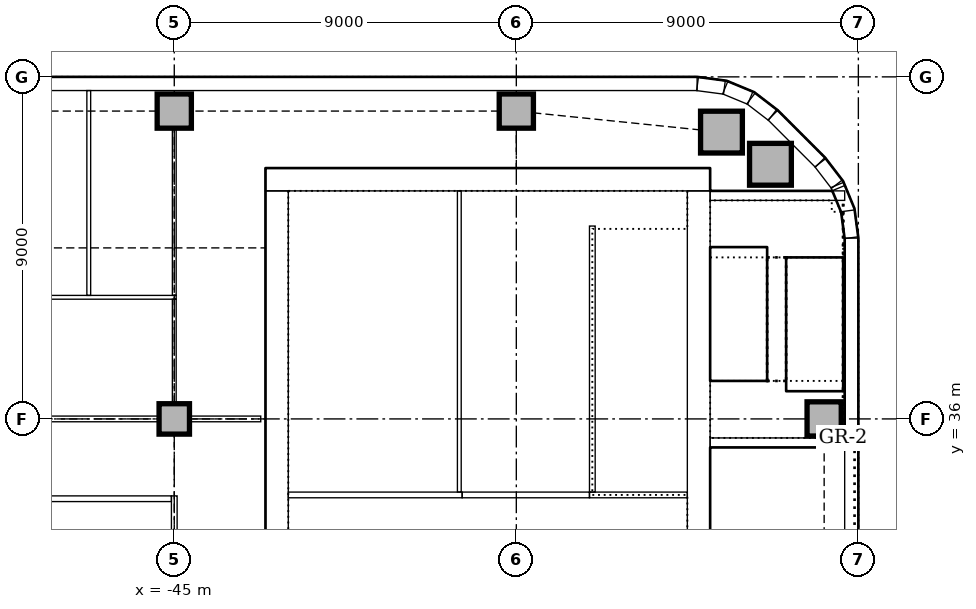
"""IFC4 building model, lengths in metres.
Left out: names, types, materials, properties, quantities, classifications, styles, units other than length and angle.
Written with IfcOpenShell. Run it as: python <this file> out.ifc"""

import sys

from ifc_helpers import new_model, si_unit, direction, frame, frame_2d, origin, origin_2d, place, context, subcontext, project, spatial, rectangle, extrude, element, fill, save


model = new_model("IFC4")
c1 = context("Model", 3, precision=1e-05, world=origin(), true_north=direction((0.0, 1.0)))
c2 = subcontext(c1, "Body", "Model", "MODEL_VIEW")
j1 = project(units=[si_unit("LENGTHUNIT", "METRE"), si_unit("PLANEANGLEUNIT", "RADIAN")], contexts=[c1])
p1 = place(None, origin())
s1 = spatial("IfcSite", under=j1, at=p1, CompositionType="ELEMENT")
p2 = place(p1, origin())
s2 = spatial("IfcBuilding", under=s1, at=p2, CompositionType="ELEMENT")
p3 = place(p2, frame((0.0, 0.0, 26.0)))
s3 = spatial("IfcBuildingStorey", under=s2, at=p3, CompositionType="ELEMENT", Elevation=26.0)
p4 = place(p3, frame((-30.9, 42.3, 0.0), z_axis=(0.0, 0.0, 1.0), x_axis=(-1.0, 0.0, 0.0)))
e1 = element("IfcWall", 1, at=p4, inside=s3, PredefinedType="SOLIDWALL", context=c2, shape_type="SweptSolid", body=[
    extrude(rectangle(XDim=11.7, YDim=0.6, at=frame_2d((5.85, 0.0))), origin(), (0.0, 0.0, 1.0), 4.0),
])
p5 = place(p3, frame((-31.2, 30.5, 0.0), z_axis=(0.0, 0.0, 1.0), x_axis=(0.0, 1.0, 0.0)))
e2 = element("IfcWall", 2, at=p5, inside=s3, PredefinedType="SOLIDWALL", context=c2, shape_type="SweptSolid", body=[
    extrude(rectangle(XDim=11.5, YDim=0.6, at=frame_2d((5.75, 0.0))), origin(), (0.0, 0.0, 1.0), 4.0),
])
p6 = place(p5, frame((0.85, 0.0, 0.0)))
e3 = element("IfcOpeningElement", 3, at=p6, cuts=e2, PredefinedType="OPENING", context=c2, shape_type="SweptSolid", body=[
    extrude(rectangle(XDim=1.8, YDim=2.1, at=frame_2d((0.9, 1.05))), frame((0.0, 0.31, 0.0), z_axis=(0.0, -1.0, 0.0), x_axis=(1.0, 0.0, 0.0)), (0.0, 0.0, 1.0), 0.62),
])
p7 = place(p3, frame((-42.3, 42.0, 0.0), z_axis=(0.0, 0.0, 1.0), x_axis=(0.0, -1.0, 0.0)))
e4 = element("IfcWall", 4, at=p7, inside=s3, PredefinedType="SOLIDWALL", context=c2, shape_type="SweptSolid", body=[
    extrude(rectangle(XDim=11.5, YDim=0.6, at=frame_2d((5.75, 0.0))), origin(), (0.0, 0.0, 1.0), 4.0),
])
p8 = place(p7, frame((8.85, 0.0, 0.0)))
e5 = element("IfcOpeningElement", 5, at=p8, cuts=e4, PredefinedType="OPENING", context=c2, shape_type="SweptSolid", body=[
    extrude(rectangle(XDim=1.8, YDim=2.1, at=frame_2d((0.9, 1.05))), frame((0.0, 0.31, 0.0), z_axis=(0.0, -1.0, 0.0), x_axis=(1.0, 0.0, 0.0)), (0.0, 0.0, 1.0), 0.62),
])
p9 = place(p3, frame((-30.9, 35.375, 0.0), z_axis=(0.0, 0.0, 1.0), x_axis=(1.0, 0.0, 0.0)))
e6 = element("IfcWall", 6, at=p9, inside=s3, PredefinedType="SOLIDWALL", context=c2, shape_type="SweptSolid", body=[
    extrude(rectangle(XDim=3.54, YDim=0.25, at=frame_2d((1.77, 0.0))), origin(), (0.0, 0.0, 1.0), 4.0),
])
p10 = place(p9, frame((0.75, 0.0, 0.0)))
e7 = element("IfcOpeningElement", 7, at=p10, cuts=e6, PredefinedType="OPENING", context=c2, shape_type="SweptSolid", body=[
    extrude(rectangle(XDim=1.1, YDim=2.1, at=frame_2d((0.55, 1.05))), frame((0.0, 0.135, 0.0), z_axis=(0.0, -1.0, 0.0), x_axis=(1.0, 0.0, 0.0)), (0.0, 0.0, 1.0), 0.27),
])
p11 = place(p3, frame((-27.36, 41.875, 0.0), z_axis=(0.0, 0.0, 1.0), x_axis=(-1.0, 0.0, 0.0)))
e8 = element("IfcWall", 8, at=p11, inside=s3, PredefinedType="SOLIDWALL", context=c2, shape_type="SweptSolid", body=[
    extrude(rectangle(XDim=3.54, YDim=0.25, at=frame_2d((1.77, 0.0))), origin(), (0.0, 0.0, 1.0), 4.0),
])
for number, where, z_axis, x_axis in (
    (9, (-29.313, 42.7, 0.0), (0.0, 0.0, 1.0), (1.0, 0.0, 0.0)),
    (10, (-30.602, 43.547, 0.0), (0.0, 0.0, 1.0), (1.0, 0.0, 0.0)),
):
    element("IfcColumn", number, at=place(p3, frame(where, z_axis=z_axis, x_axis=x_axis)), inside=s3, PredefinedType="COLUMN", context=c2, shape_type="SweptSolid", body=[
        extrude(rectangle(XDim=1.1, YDim=1.1, at=origin_2d()), origin(), (0.0, 0.0, 1.0), 3.85),
    ])
p12 = place(p3, frame((-27.9, 36.0, 0.0), z_axis=(0.0, 0.0, 1.0), x_axis=(1.0, 0.0, 0.0)))
e11 = element("IfcColumn", 11, at=p12, inside=s3, PredefinedType="COLUMN", context=c2, shape_type="SweptSolid", body=[
    extrude(rectangle(XDim=0.9, YDim=0.9, at=origin_2d()), origin(), (0.0, 0.0, 1.0), 4.0),
])
for number, where, z_axis, x_axis in (
    (12, (-45.0, 44.1, 0.0), (0.0, 0.0, 1.0), (1.0, 0.0, 0.0)),
    (13, (-36.0, 44.1, 0.0), (0.0, 0.0, 1.0), (1.0, 0.0, 0.0)),
):
    element("IfcColumn", number, at=place(p3, frame(where, z_axis=z_axis, x_axis=x_axis)), inside=s3, PredefinedType="COLUMN", context=c2, shape_type="SweptSolid", body=[
        extrude(rectangle(XDim=0.9, YDim=0.9, at=origin_2d()), origin(), (0.0, 0.0, 1.0), 3.85),
    ])
p13 = place(p3, frame((-45.0, 36.0, 0.0), z_axis=(0.0, 0.0, 1.0), x_axis=(1.0, 0.0, 0.0)))
e14 = element("IfcColumn", 14, at=p13, inside=s3, PredefinedType="COLUMN", context=c2, shape_type="SweptSolid", body=[
    extrude(rectangle(XDim=0.8, YDim=0.8, at=origin_2d()), origin(), (0.0, 0.0, 1.0), 3.85),
])
p14 = place(p3, frame((-27.18, 27.75, 0.0), z_axis=(0.0, 0.0, 1.0), x_axis=(0.0, 1.0, 0.0)))
e15 = element("IfcWall", 15, at=p14, inside=s3, PredefinedType="STANDARD", context=c2, shape_type="SweptSolid", body=[
    extrude(rectangle(XDim=7.5, YDim=0.36, at=frame_2d((3.75, 0.0))), origin(), (0.0, 0.0, 1.0), 3.85),
])
p15 = place(p14, frame((2.85, 0.0, 1.2)))
e16 = element("IfcOpeningElement", 16, at=p15, cuts=e15, PredefinedType="OPENING", context=c2, shape_type="SweptSolid", body=[
    extrude(rectangle(XDim=1.8, YDim=1.2, at=frame_2d((0.9, 0.6))), frame((0.0, 0.19, 0.0), z_axis=(0.0, -1.0, 0.0), x_axis=(1.0, 0.0, 0.0)), (0.0, 0.0, 1.0), 0.38),
])
p16 = place(p3, frame((-27.18, 35.25, 0.0), z_axis=(0.0, 0.0, 1.0), x_axis=(0.0, 1.0, 0.0)))
e17 = element("IfcWall", 17, at=p16, inside=s3, PredefinedType="STANDARD", context=c2, shape_type="SweptSolid", body=[
    extrude(rectangle(XDim=5.507, YDim=0.36, at=frame_2d((2.754, 0.0))), origin(), (0.0, 0.0, 1.0), 3.85),
])
p17 = place(p3, frame((-28.006, 42.751, 0.0), z_axis=(0.0, 0.0, 1.0), x_axis=(-0.707106781187, 0.707106781187, 0.0)))
e18 = element("IfcWall", 18, at=p17, inside=s3, PredefinedType="STANDARD", context=c2, shape_type="SweptSolid", body=[
    extrude(rectangle(XDim=1.757, YDim=0.36, at=frame_2d((0.879, 0.0))), origin(), (0.0, 0.0, 1.0), 3.85),
])
p18 = place(p3, frame((-31.243, 44.82, 0.0), z_axis=(0.0, 0.0, 1.0), x_axis=(-1.0, 0.0, 0.0)))
e19 = element("IfcWall", 19, at=p18, inside=s3, PredefinedType="STANDARD", context=c2, shape_type="SweptSolid", body=[
    extrude(rectangle(XDim=36.515, YDim=0.36, at=frame_2d((18.257, 0.0))), origin(), (0.0, 0.0, 1.0), 3.85),
])
p19 = place(p18, frame((3.107, 0.0, 0.9)))
e20 = element("IfcOpeningElement", 20, at=p19, cuts=e19, PredefinedType="OPENING", context=c2, shape_type="SweptSolid", body=[
    extrude(rectangle(XDim=3.3, YDim=1.6, at=frame_2d((1.65, 0.8))), frame((0.0, 0.19, 0.0), z_axis=(0.0, -1.0, 0.0), x_axis=(1.0, 0.0, 0.0)), (0.0, 0.0, 1.0), 0.38),
])
p20 = place(p18, frame((7.607, 0.0, 0.9)))
e21 = element("IfcOpeningElement", 21, at=p20, cuts=e19, PredefinedType="OPENING", context=c2, shape_type="SweptSolid", body=[
    extrude(rectangle(XDim=3.3, YDim=1.6, at=frame_2d((1.65, 0.8))), frame((0.0, 0.19, 0.0), z_axis=(0.0, -1.0, 0.0), x_axis=(1.0, 0.0, 0.0)), (0.0, 0.0, 1.0), 0.38),
])
p21 = place(p18, frame((12.107, 0.0, 0.9)))
e22 = element("IfcOpeningElement", 22, at=p21, cuts=e19, PredefinedType="OPENING", context=c2, shape_type="SweptSolid", body=[
    extrude(rectangle(XDim=3.3, YDim=1.6, at=frame_2d((1.65, 0.8))), frame((0.0, 0.19, 0.0), z_axis=(0.0, -1.0, 0.0), x_axis=(1.0, 0.0, 0.0)), (0.0, 0.0, 1.0), 0.38),
])
p22 = place(p18, frame((16.607, 0.0, 0.9)))
e23 = element("IfcOpeningElement", 23, at=p22, cuts=e19, PredefinedType="OPENING", context=c2, shape_type="SweptSolid", body=[
    extrude(rectangle(XDim=3.3, YDim=1.6, at=frame_2d((1.65, 0.8))), frame((0.0, 0.19, 0.0), z_axis=(0.0, -1.0, 0.0), x_axis=(1.0, 0.0, 0.0)), (0.0, 0.0, 1.0), 0.38),
])
p23 = place(p18, frame((21.107, 0.0, 0.9)))
e24 = element("IfcOpeningElement", 24, at=p23, cuts=e19, PredefinedType="OPENING", context=c2, shape_type="SweptSolid", body=[
    extrude(rectangle(XDim=3.3, YDim=1.6, at=frame_2d((1.65, 0.8))), frame((0.0, 0.19, 0.0), z_axis=(0.0, -1.0, 0.0), x_axis=(1.0, 0.0, 0.0)), (0.0, 0.0, 1.0), 0.38),
])
p24 = place(p18, frame((25.607, 0.0, 0.9)))
e25 = element("IfcOpeningElement", 25, at=p24, cuts=e19, PredefinedType="OPENING", context=c2, shape_type="SweptSolid", body=[
    extrude(rectangle(XDim=3.3, YDim=1.6, at=frame_2d((1.65, 0.8))), frame((0.0, 0.19, 0.0), z_axis=(0.0, -1.0, 0.0), x_axis=(1.0, 0.0, 0.0)), (0.0, 0.0, 1.0), 0.38),
])
p25 = place(p18, frame((30.107, 0.0, 0.9)))
e26 = element("IfcOpeningElement", 26, at=p25, cuts=e19, PredefinedType="OPENING", context=c2, shape_type="SweptSolid", body=[
    extrude(rectangle(XDim=3.3, YDim=1.6, at=frame_2d((1.65, 0.8))), frame((0.0, 0.19, 0.0), z_axis=(0.0, -1.0, 0.0), x_axis=(1.0, 0.0, 0.0)), (0.0, 0.0, 1.0), 0.38),
])
p26 = place(p3, frame((-27.183, 40.769, 0.0), z_axis=(0.0, 0.0, 1.0), x_axis=(-0.13055608231, 0.99144092581, 0.0)))
e27 = element("IfcWall", 27, at=p26, inside=s3, PredefinedType="STANDARD", context=c2, shape_type="SweptSolid", body=[
    extrude(rectangle(XDim=0.713, YDim=0.36, at=frame_2d((0.356, 0.0))), origin(), (0.0, 0.0, 1.0), 3.85),
])
p27 = place(p3, frame((-27.521, 42.074, 0.0), z_axis=(0.0, 0.0, 1.0), x_axis=(-0.382549378284, 0.923935048136, 0.0)))
e28 = element("IfcWall", 28, at=p27, inside=s3, PredefinedType="STANDARD", context=c2, shape_type="SweptSolid", body=[
    extrude(rectangle(XDim=0.089, YDim=0.36, at=frame_2d((0.045, 0.0))), origin(), (0.0, 0.0, 1.0), 3.85),
])
for number, where, z_axis, x_axis in (
    (29, (-27.566, 42.175, 0.0), (0.0, 0.0, 1.0), (-0.609, 0.793, 0.0)),
    (30, (-29.259, 44.0, 0.0), (0.0, 0.0, 1.0), (-0.793, 0.609, 0.0)),
):
    element("IfcWall", number, at=place(p3, frame(where, z_axis=z_axis, x_axis=x_axis)), inside=s3, PredefinedType="STANDARD", context=c2, shape_type="SweptSolid", body=[
        extrude(rectangle(XDim=0.713, YDim=0.36, at=frame_2d((0.357, 0.0))), origin(), (0.0, 0.0, 1.0), 3.85),
    ])
for number, where, z_axis, x_axis in (
    (31, (-29.844, 44.445, 0.0), (0.0, 0.0, 1.0), (-0.924, 0.383, 0.0)),
    (32, (-30.524, 44.724, 0.0), (0.0, 0.0, 1.0), (-0.991, 0.131, 0.0)),
):
    element("IfcWall", number, at=place(p3, frame(where, z_axis=z_axis, x_axis=x_axis)), inside=s3, PredefinedType="STANDARD", context=c2, shape_type="SweptSolid", body=[
        extrude(rectangle(XDim=0.713, YDim=0.36, at=frame_2d((0.356, 0.0))), origin(), (0.0, 0.0, 1.0), 3.85),
    ])
p28 = place(p3, frame((-34.075, 34.0, 0.0), z_axis=(0.0, 0.0, 1.0), x_axis=(1.0, 0.0, 0.0)))
e33 = element("IfcWall", 33, at=p28, inside=s3, PredefinedType="SOLIDWALL", context=c2, shape_type="SweptSolid", body=[
    extrude(rectangle(XDim=2.575, YDim=0.15, at=frame_2d((1.288, 0.0))), origin(), (0.0, 0.0, 1.0), 4.0),
])
p29 = place(p3, frame((-34.0, 41.075, 0.0), z_axis=(0.0, 0.0, 1.0), x_axis=(0.0, -1.0, 0.0)))
e34 = element("IfcWall", 34, at=p29, inside=s3, PredefinedType="SOLIDWALL", context=c2, shape_type="SweptSolid", body=[
    extrude(rectangle(XDim=7.0, YDim=0.15, at=frame_2d((3.5, 0.0))), origin(), (0.0, 0.0, 1.0), 4.0),
])
p30 = place(p3, frame((-37.425, 34.0, 0.0), z_axis=(0.0, 0.0, 1.0), x_axis=(-1.0, 0.0, 0.0)))
e35 = element("IfcWall", 35, at=p30, inside=s3, PredefinedType="PARTITIONING", context=c2, shape_type="SweptSolid", body=[
    extrude(rectangle(XDim=4.575, YDim=0.15, at=frame_2d((2.288, 0.0))), origin(), (0.0, 0.0, 1.0), 3.85),
])
p31 = place(p30, frame((1.925, 0.0, 0.0)))
e36 = element("IfcOpeningElement", 36, at=p31, cuts=e35, PredefinedType="OPENING", context=c2, shape_type="SweptSolid", body=[
    extrude(rectangle(XDim=0.8, YDim=2.1, at=frame_2d((0.4, 1.05))), frame((0.0, 0.085, 0.0), z_axis=(0.0, -1.0, 0.0), x_axis=(1.0, 0.0, 0.0)), (0.0, 0.0, 1.0), 0.17),
])
p32 = place(p3, frame((-34.075, 34.0, 0.0), z_axis=(0.0, 0.0, 1.0), x_axis=(-1.0, 0.0, 0.0)))
e37 = element("IfcWall", 37, at=p32, inside=s3, PredefinedType="PARTITIONING", context=c2, shape_type="SweptSolid", body=[
    extrude(rectangle(XDim=3.35, YDim=0.15, at=frame_2d((1.675, 0.0))), origin(), (0.0, 0.0, 1.0), 3.85),
])
p33 = place(p32, frame((1.275, 0.0, 0.0)))
e38 = element("IfcOpeningElement", 38, at=p33, cuts=e37, PredefinedType="OPENING", context=c2, shape_type="SweptSolid", body=[
    extrude(rectangle(XDim=0.8, YDim=2.1, at=frame_2d((0.4, 1.05))), frame((0.0, 0.085, 0.0), z_axis=(0.0, -1.0, 0.0), x_axis=(1.0, 0.0, 0.0)), (0.0, 0.0, 1.0), 0.17),
])
p34 = place(p3, frame((-37.5, 34.075, 0.0), z_axis=(0.0, 0.0, 1.0), x_axis=(0.0, 1.0, 0.0)))
e39 = element("IfcWall", 39, at=p34, inside=s3, PredefinedType="PARTITIONING", context=c2, shape_type="SweptSolid", body=[
    extrude(rectangle(XDim=7.925, YDim=0.1, at=frame_2d((3.962, 0.0))), origin(), (0.0, 0.0, 1.0), 3.85),
])
p35 = place(p3, frame((-44.6, 36.0, 0.0), z_axis=(0.0, 0.0, 1.0), x_axis=(1.0, 0.0, 0.0)))
e40 = element("IfcWall", 40, at=p35, inside=s3, PredefinedType="PARTITIONING", context=c2, shape_type="SweptSolid", body=[
    extrude(rectangle(XDim=1.875, YDim=0.15, at=frame_2d((0.938, 0.0))), origin(), (0.0, 0.0, 1.0), 3.602),
])
p36 = place(p35, frame((0.5, 0.0, 0.0)))
e41 = element("IfcOpeningElement", 41, at=p36, cuts=e40, PredefinedType="OPENING", context=c2, shape_type="SweptSolid", body=[
    extrude(rectangle(XDim=0.9, YDim=2.1, at=frame_2d((0.45, 1.05))), frame((0.0, 0.085, 0.0), z_axis=(0.0, -1.0, 0.0), x_axis=(1.0, 0.0, 0.0)), (0.0, 0.0, 1.0), 0.17),
])
p37 = place(p3, frame((-53.6, 36.0, 0.0), z_axis=(0.0, 0.0, 1.0), x_axis=(1.0, 0.0, 0.0)))
e42 = element("IfcWall", 42, at=p37, inside=s3, PredefinedType="PARTITIONING", context=c2, shape_type="SweptSolid", body=[
    extrude(rectangle(XDim=8.2, YDim=0.15, at=frame_2d((4.1, 0.0))), origin(), (0.0, 0.0, 1.0), 3.15),
])
p38 = place(p37, frame((2.89, 0.0, 0.0)))
e43 = element("IfcOpeningElement", 43, at=p38, cuts=e42, PredefinedType="OPENING", context=c2, shape_type="SweptSolid", body=[
    extrude(rectangle(XDim=1.0, YDim=2.1, at=frame_2d((0.5, 1.05))), frame((0.0, 0.085, 0.0), z_axis=(0.0, -1.0, 0.0), x_axis=(1.0, 0.0, 0.0)), (0.0, 0.0, 1.0), 0.17),
])
p39 = place(p3, frame((-45.0, 27.4, 0.0), z_axis=(0.0, 0.0, 1.0), x_axis=(0.0, 1.0, 0.0)))
e44 = element("IfcWall", 44, at=p39, inside=s3, PredefinedType="PARTITIONING", context=c2, shape_type="SweptSolid", body=[
    extrude(rectangle(XDim=6.575, YDim=0.15, at=frame_2d((3.288, 0.0))), origin(), (0.0, 0.0, 1.0), 3.158),
])
p40 = place(p3, frame((-52.575, 33.9, 0.0), z_axis=(0.0, 0.0, 1.0), x_axis=(1.0, 0.0, 0.0)))
e45 = element("IfcWall", 45, at=p40, inside=s3, PredefinedType="PARTITIONING", context=c2, shape_type="SweptSolid", body=[
    extrude(rectangle(XDim=7.5, YDim=0.15, at=frame_2d((3.75, 0.0))), origin(), (0.0, 0.0, 1.0), 3.85),
])
p41 = place(p40, frame((3.3, 0.0, 0.0)))
e46 = element("IfcOpeningElement", 46, at=p41, cuts=e45, PredefinedType="OPENING", context=c2, shape_type="SweptSolid", body=[
    extrude(rectangle(XDim=0.9, YDim=2.1, at=frame_2d((0.45, 1.05))), frame((0.0, 0.085, 0.0), z_axis=(0.0, -1.0, 0.0), x_axis=(1.0, 0.0, 0.0)), (0.0, 0.0, 1.0), 0.17),
])
p42 = place(p3, frame((-53.925, 39.2, 0.0), z_axis=(0.0, 0.0, 1.0), x_axis=(1.0, 0.0, 0.0)))
e47 = element("IfcWall", 47, at=p42, inside=s3, PredefinedType="PARTITIONING", context=c2, shape_type="SweptSolid", body=[
    extrude(rectangle(XDim=8.975, YDim=0.1, at=frame_2d((4.487, 0.0))), origin(), (0.0, 0.0, 1.0), 3.85),
])
p43 = place(p42, frame((3.265, 0.0, 0.0)))
e48 = element("IfcOpeningElement", 48, at=p43, cuts=e47, PredefinedType="OPENING", context=c2, shape_type="SweptSolid", body=[
    extrude(rectangle(XDim=0.9, YDim=2.1, at=frame_2d((0.45, 1.05))), frame((0.0, 0.06, 0.0), z_axis=(0.0, -1.0, 0.0), x_axis=(1.0, 0.0, 0.0)), (0.0, 0.0, 1.0), 0.12),
])
p44 = place(p3, frame((-45.0, 39.25, 0.0), z_axis=(0.0, 0.0, 1.0), x_axis=(0.0, 1.0, 0.0)))
e49 = element("IfcWall", 49, at=p44, inside=s3, PredefinedType="PARTITIONING", context=c2, shape_type="SweptSolid", body=[
    extrude(rectangle(XDim=4.4, YDim=0.1, at=frame_2d((2.2, 0.0))), origin(), (0.0, 0.0, 1.0), 3.158),
])
p45 = place(p3, frame((-45.0, 36.4, 0.0), z_axis=(0.0, 0.0, 1.0), x_axis=(0.0, 1.0, 0.0)))
e50 = element("IfcWall", 50, at=p45, inside=s3, PredefinedType="PARTITIONING", context=c2, shape_type="SweptSolid", body=[
    extrude(rectangle(XDim=2.75, YDim=0.1, at=frame_2d((1.375, 0.0))), origin(), (0.0, 0.0, 1.0), 3.158),
])
p46 = place(p3, frame((-47.25, 39.25, 0.0), z_axis=(0.0, 0.0, 1.0), x_axis=(0.0, 1.0, 0.0)))
e51 = element("IfcWall", 51, at=p46, inside=s3, PredefinedType="PARTITIONING", context=c2, shape_type="SweptSolid", body=[
    extrude(rectangle(XDim=5.39, YDim=0.1, at=frame_2d((2.695, 0.0))), origin(), (0.0, 0.0, 1.0), 3.85),
])
p47 = place(p46, frame((2.25, 0.0, 0.0)))
e52 = element("IfcOpeningElement", 52, at=p47, cuts=e51, PredefinedType="OPENING", context=c2, shape_type="SweptSolid", body=[
    extrude(rectangle(XDim=0.9, YDim=2.1, at=frame_2d((0.45, 1.05))), frame((0.0, 0.06, 0.0), z_axis=(0.0, -1.0, 0.0), x_axis=(1.0, 0.0, 0.0)), (0.0, 0.0, 1.0), 0.12),
])
p48 = place(p19, origin())
e53 = element("IfcWindow", 53, at=p48, inside=s3, PartitioningType="SINGLE_PANEL", PredefinedType="WINDOW", context=c2, shape_type="SweptSolid", body=[
    extrude(rectangle(XDim=3.3, YDim=1.6, at=frame_2d((1.65, 0.8))), frame((0.0, 0.13, 0.0), z_axis=(0.0, -1.0, 0.0), x_axis=(1.0, 0.0, 0.0)), (0.0, 0.0, 1.0), 0.06),
])
fill(e20, e53)
p49 = place(p20, origin())
e54 = element("IfcWindow", 54, at=p49, inside=s3, PartitioningType="SINGLE_PANEL", PredefinedType="WINDOW", context=c2, shape_type="SweptSolid", body=[
    extrude(rectangle(XDim=3.3, YDim=1.6, at=frame_2d((1.65, 0.8))), frame((0.0, 0.13, 0.0), z_axis=(0.0, -1.0, 0.0), x_axis=(1.0, 0.0, 0.0)), (0.0, 0.0, 1.0), 0.06),
])
fill(e21, e54)
p50 = place(p21, origin())
e55 = element("IfcWindow", 55, at=p50, inside=s3, PartitioningType="SINGLE_PANEL", PredefinedType="WINDOW", context=c2, shape_type="SweptSolid", body=[
    extrude(rectangle(XDim=3.3, YDim=1.6, at=frame_2d((1.65, 0.8))), frame((0.0, 0.13, 0.0), z_axis=(0.0, -1.0, 0.0), x_axis=(1.0, 0.0, 0.0)), (0.0, 0.0, 1.0), 0.06),
])
fill(e22, e55)
p51 = place(p22, origin())
e56 = element("IfcWindow", 56, at=p51, inside=s3, PartitioningType="SINGLE_PANEL", PredefinedType="WINDOW", context=c2, shape_type="SweptSolid", body=[
    extrude(rectangle(XDim=3.3, YDim=1.6, at=frame_2d((1.65, 0.8))), frame((0.0, 0.13, 0.0), z_axis=(0.0, -1.0, 0.0), x_axis=(1.0, 0.0, 0.0)), (0.0, 0.0, 1.0), 0.06),
])
fill(e23, e56)
p52 = place(p10, origin())
e57 = element("IfcDoor", 57, at=p52, inside=s3, OperationType="SINGLE_SWING_RIGHT", PredefinedType="DOOR", context=c2, shape_type="SweptSolid", body=[
    extrude(rectangle(XDim=1.1, YDim=2.1, at=frame_2d((0.55, 1.05))), frame((0.0, 0.025, 0.0), z_axis=(0.0, -1.0, 0.0), x_axis=(1.0, 0.0, 0.0)), (0.0, 0.0, 1.0), 0.05),
])
fill(e7, e57)
p53 = place(p6, origin())
e58 = element("IfcDoor", 58, at=p53, inside=s3, OperationType="DOUBLE_DOOR_SINGLE_SWING", PredefinedType="DOOR", context=c2, shape_type="SweptSolid", body=[
    extrude(rectangle(XDim=1.8, YDim=2.1, at=frame_2d((0.9, 1.05))), frame((0.0, 0.025, 0.0), z_axis=(0.0, -1.0, 0.0), x_axis=(1.0, 0.0, 0.0)), (0.0, 0.0, 1.0), 0.05),
])
fill(e3, e58)
p54 = place(p8, frame((1.8, 0.0, 0.0), z_axis=(0.0, 0.0, 1.0), x_axis=(-1.0, 0.0, 0.0)))
e59 = element("IfcDoor", 59, at=p54, inside=s3, OperationType="DOUBLE_DOOR_SINGLE_SWING", PredefinedType="DOOR", context=c2, shape_type="SweptSolid", body=[
    extrude(rectangle(XDim=1.8, YDim=2.1, at=frame_2d((0.9, 1.05))), frame((0.0, 0.025, 0.0), z_axis=(0.0, -1.0, 0.0), x_axis=(1.0, 0.0, 0.0)), (0.0, 0.0, 1.0), 0.05),
])
fill(e5, e59)
p55 = place(p31, frame((0.8, 0.0, 0.0), z_axis=(0.0, 0.0, 1.0), x_axis=(-1.0, 0.0, 0.0)))
e60 = element("IfcDoor", 60, at=p55, inside=s3, OperationType="SINGLE_SWING_RIGHT", PredefinedType="DOOR", context=c2, shape_type="SweptSolid", body=[
    extrude(rectangle(XDim=0.8, YDim=2.1, at=frame_2d((0.4, 1.05))), frame((0.0, 0.025, 0.0), z_axis=(0.0, -1.0, 0.0), x_axis=(1.0, 0.0, 0.0)), (0.0, 0.0, 1.0), 0.05),
])
fill(e36, e60)
p56 = place(p33, frame((0.8, 0.0, 0.0), z_axis=(0.0, 0.0, 1.0), x_axis=(-1.0, 0.0, 0.0)))
e61 = element("IfcDoor", 61, at=p56, inside=s3, OperationType="SINGLE_SWING_LEFT", PredefinedType="DOOR", context=c2, shape_type="SweptSolid", body=[
    extrude(rectangle(XDim=0.8, YDim=2.1, at=frame_2d((0.4, 1.05))), frame((0.0, 0.025, 0.0), z_axis=(0.0, -1.0, 0.0), x_axis=(1.0, 0.0, 0.0)), (0.0, 0.0, 1.0), 0.05),
])
fill(e38, e61)
p57 = place(p36, origin())
e62 = element("IfcDoor", 62, at=p57, inside=s3, OperationType="SINGLE_SWING_LEFT", PredefinedType="DOOR", context=c2, shape_type="SweptSolid", body=[
    extrude(rectangle(XDim=0.9, YDim=2.1, at=frame_2d((0.45, 1.05))), frame((0.0, 0.025, 0.0), z_axis=(0.0, -1.0, 0.0), x_axis=(1.0, 0.0, 0.0)), (0.0, 0.0, 1.0), 0.05),
])
fill(e41, e62)
p58 = place(p47, frame((0.9, 0.0, 0.0), z_axis=(0.0, 0.0, 1.0), x_axis=(-1.0, 0.0, 0.0)))
e63 = element("IfcDoor", 63, at=p58, inside=s3, OperationType="SINGLE_SWING_RIGHT", PredefinedType="DOOR", context=c2, shape_type="SweptSolid", body=[
    extrude(rectangle(XDim=0.9, YDim=2.1, at=frame_2d((0.45, 1.05))), frame((0.0, 0.025, 0.0), z_axis=(0.0, -1.0, 0.0), x_axis=(1.0, 0.0, 0.0)), (0.0, 0.0, 1.0), 0.05),
])
fill(e52, e63)
save(model, sys.argv[1])
